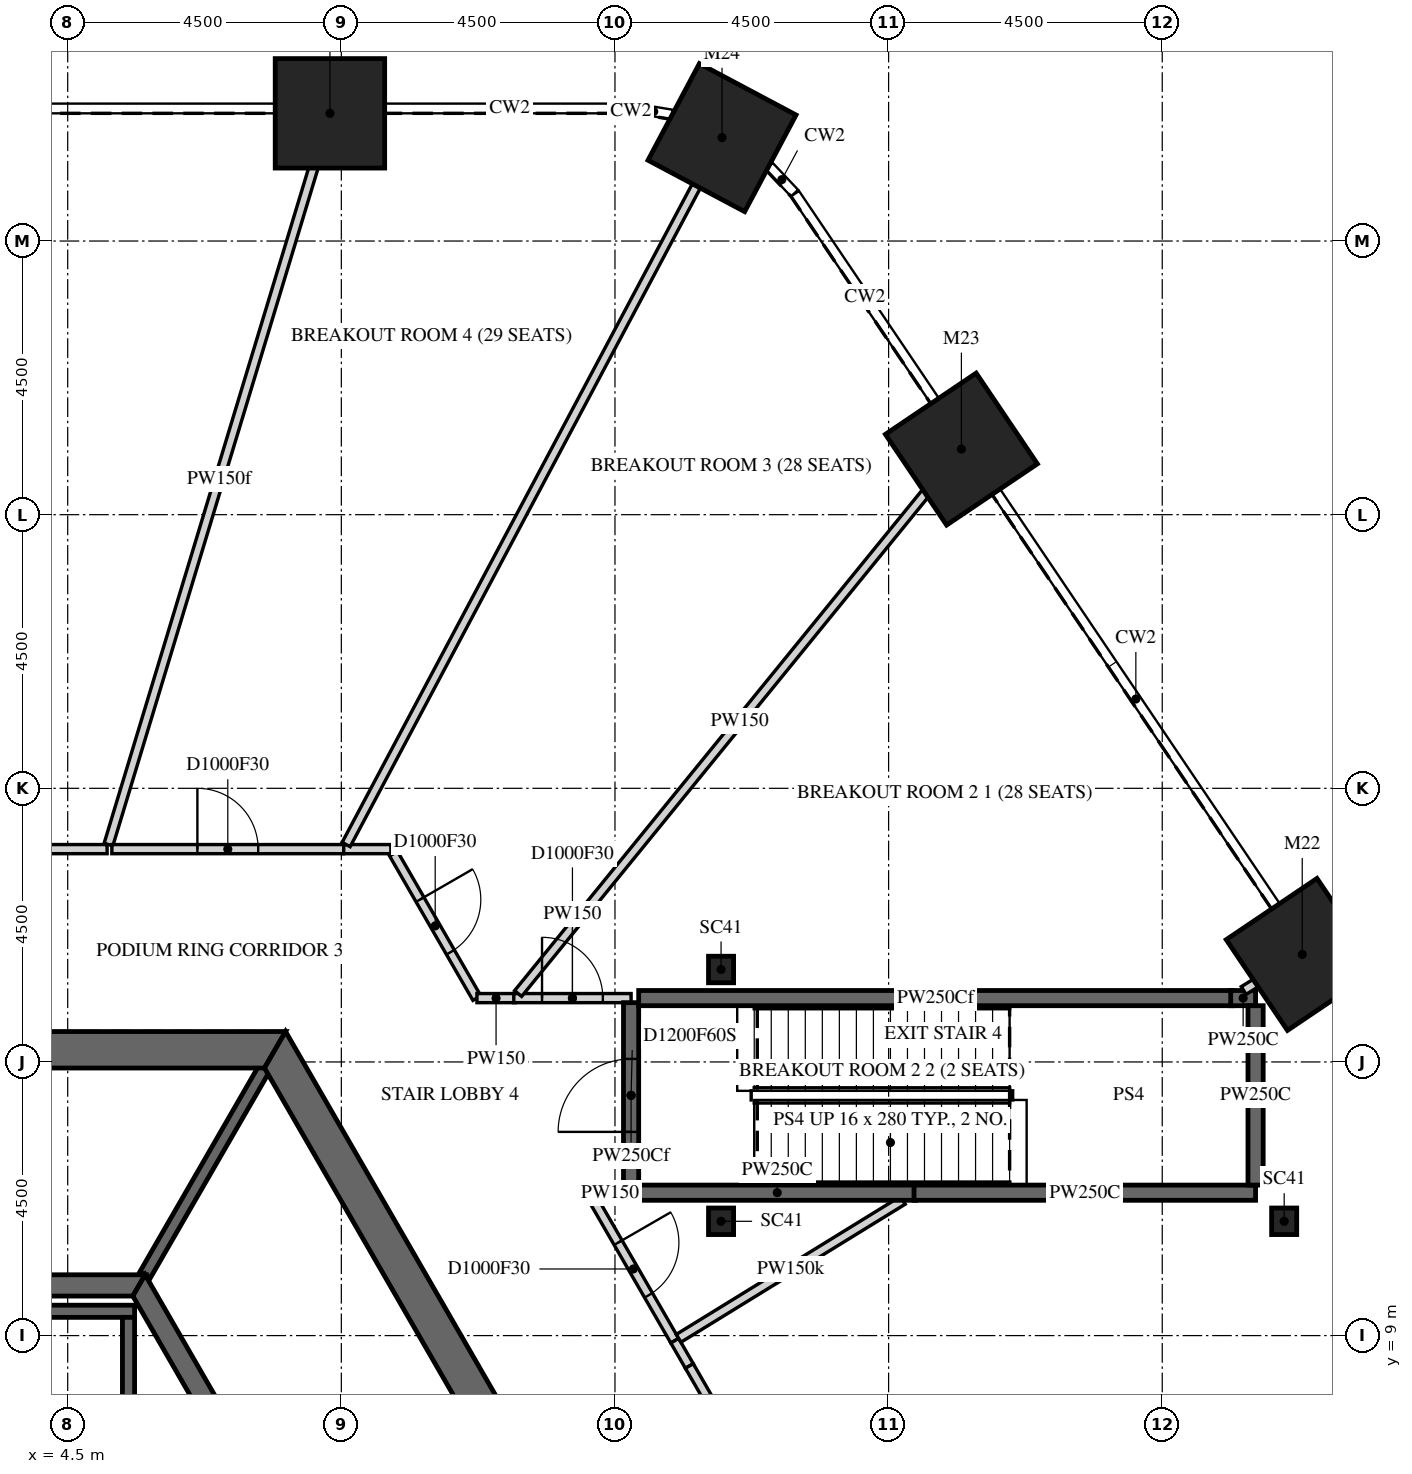
"""IFC4 building model, lengths in metres.
Left out: names, types, materials, properties, quantities, classifications, styles, units other than length and angle.
Written with IfcOpenShell. Run it as: python <this file> out.ifc"""

import sys

from ifc_helpers import new_model, si_unit, direction, frame, frame_2d, origin, origin_2d, place, context, subcontext, project, spatial, polyline, rectangle, i_section, outline, extrude, element, fill, save


model = new_model("IFC4")
c1 = context("Model", 3, precision=1e-05, world=origin(), true_north=direction((0.0, 1.0)))
c2 = subcontext(c1, "Body", "Model", "MODEL_VIEW")
j1 = project(units=[si_unit("LENGTHUNIT", "METRE"), si_unit("PLANEANGLEUNIT", "RADIAN")], contexts=[c1])
p1 = place(None, origin())
s1 = spatial("IfcSite", under=j1, at=p1, CompositionType="ELEMENT")
p2 = place(p1, origin())
s2 = spatial("IfcBuilding", under=s1, at=p2, CompositionType="ELEMENT")
p3 = place(p2, frame((0.0, 0.0, 20.5)))
s3 = spatial("IfcBuildingStorey", under=s2, at=p3, CompositionType="ELEMENT", Elevation=20.5)
for number, where, z_axis, x_axis in (
    (1, (8.812, 29.1, -0.25), (0.0, 0.0, 1.0), (1.0, 0.0, 0.0)),
    (2, (24.802, 15.269, -0.25), (0.0, 0.0, 1.0), (0.559, -0.829, 0.0)),
    (3, (19.197, 23.579, -0.25), (0.0, 0.0, 1.0), (0.559, -0.829, 0.0)),
    (4, (15.26, 28.701, -0.25), (0.0, 0.0, 1.0), (0.883, -0.469, 0.0)),
):
    element("IfcColumn", number, at=place(p3, frame(where, z_axis=z_axis, x_axis=x_axis)), inside=s3, PredefinedType="COLUMN", context=c2, shape_type="SweptSolid", body=[
        extrude(rectangle(XDim=1.8, YDim=1.8, at=origin_2d()), origin(), (0.0, 0.0, 1.0), 5.5),
    ])
for number, where, z_axis, x_axis in (
    (5, (24.505, 10.88, -0.25), (0.0, 0.0, 1.0), (1.0, 0.0, 0.0)),
    (6, (15.245, 10.88, -0.25), (0.0, 0.0, 1.0), (1.0, 0.0, 0.0)),
    (7, (15.245, 15.02, -0.25), (0.0, 0.0, 1.0), (1.0, 0.0, 0.0)),
):
    element("IfcColumn", number, at=place(p3, frame(where, z_axis=z_axis, x_axis=x_axis)), inside=s3, PredefinedType="COLUMN", context=c2, shape_type="SweptSolid", body=[
        extrude(i_section(OverallWidth=0.412, OverallDepth=0.437, WebThickness=0.036, FlangeThickness=0.058, FilletRadius=0.015, at=origin_2d()), origin(), (0.0, 0.0, 1.0), 5.5),
    ])
p4 = place(p3, frame((15.819, 0.0, -0.25), z_axis=(0.0, 0.0, 1.0), x_axis=(-0.499999880136, 0.866025472988, 0.0)))
e8 = element("IfcWall", 8, at=p4, inside=s3, PredefinedType="SHEAR", context=c2, shape_type="SweptSolid", body=[
    extrude(outline(polyline([(-0.173, -0.3), (15.993, -0.3), (15.646, 0.3), (0.173, 0.3), (-0.173, -0.3)])), origin(), (0.0, 0.0, 1.0), 5.5),
])
p5 = place(p4, frame((6.981, 0.0, 0.25)))
e9 = element("IfcOpeningElement", 9, at=p5, cuts=e8, PredefinedType="OPENING", context=c2, shape_type="SweptSolid", body=[
    extrude(rectangle(XDim=1.8, YDim=2.4, at=frame_2d((0.9, 1.2))), frame((0.0, 0.31, 0.0), z_axis=(0.0, -1.0, 0.0), x_axis=(1.0, 0.0, 0.0)), (0.0, 0.0, 1.0), 0.62),
])
p6 = place(p3, frame((7.91, 13.7, -0.25), z_axis=(0.0, 0.0, 1.0), x_axis=(-1.0, 0.0, 0.0)))
e10 = element("IfcWall", 10, at=p6, inside=s3, PredefinedType="SHEAR", context=c2, shape_type="SweptSolid", body=[
    extrude(outline(polyline([(-0.173, -0.3), (15.993, -0.3), (15.646, 0.3), (0.173, 0.3), (-0.173, -0.3)])), origin(), (0.0, 0.0, 1.0), 5.5),
])
p7 = place(p6, frame((7.31, 0.0, 0.25)))
e11 = element("IfcOpeningElement", 11, at=p7, cuts=e10, PredefinedType="OPENING", context=c2, shape_type="SweptSolid", body=[
    extrude(rectangle(XDim=1.2, YDim=2.4, at=frame_2d((0.6, 1.2))), frame((0.0, 0.31, 0.0), z_axis=(0.0, -1.0, 0.0), x_axis=(1.0, 0.0, 0.0)), (0.0, 0.0, 1.0), 0.62),
])
p8 = place(p3, frame((11.345, 0.0, -0.25), z_axis=(0.0, 0.0, 1.0), x_axis=(-0.499995046907, 0.866028263435, 0.0)))
e12 = element("IfcWall", 12, at=p8, inside=s3, PredefinedType="SHEAR", context=c2, shape_type="SweptSolid", body=[
    extrude(outline(polyline([(-0.101, -0.175), (11.446, -0.175), (11.244, 0.175), (0.101, 0.175), (-0.101, -0.175)])), origin(), (0.0, 0.0, 1.0), 5.5),
])
p9 = place(p8, frame((4.744, 0.0, 0.25)))
e13 = element("IfcOpeningElement", 13, at=p9, cuts=e12, PredefinedType="OPENING", context=c2, shape_type="SweptSolid", body=[
    extrude(rectangle(XDim=1.8, YDim=2.4, at=frame_2d((0.9, 1.2))), frame((0.0, 0.185, 0.0), z_axis=(0.0, -1.0, 0.0), x_axis=(1.0, 0.0, 0.0)), (0.0, 0.0, 1.0), 0.37),
])
p10 = place(p3, frame((5.673, 9.825, -0.25), z_axis=(0.0, 0.0, 1.0), x_axis=(-1.0, 0.0, 0.0)))
e14 = element("IfcWall", 14, at=p10, inside=s3, PredefinedType="SHEAR", context=c2, shape_type="SweptSolid", body=[
    extrude(outline(polyline([(-0.101, -0.175), (11.446, -0.175), (11.244, 0.175), (0.101, 0.175), (-0.101, -0.175)])), origin(), (0.0, 0.0, 1.0), 5.5),
])
p11 = place(p3, frame((-5.6, 9.4, -0.25), z_axis=(0.0, 0.0, 1.0), x_axis=(1.0, 0.0, 0.0)))
e15 = element("IfcWall", 15, at=p11, inside=s3, PredefinedType="SHEAR", context=c2, shape_type="SweptSolid", body=[
    extrude(rectangle(XDim=11.2, YDim=0.2, at=frame_2d((5.6, 0.0))), origin(), (0.0, 0.0, 1.0), 5.5),
])
p12 = place(p3, frame((5.5, 6.4, -0.25), z_axis=(0.0, 0.0, 1.0), x_axis=(0.0, 1.0, 0.0)))
e16 = element("IfcWall", 16, at=p12, inside=s3, PredefinedType="SHEAR", context=c2, shape_type="SweptSolid", body=[
    extrude(rectangle(XDim=2.9, YDim=0.2, at=frame_2d((1.45, 0.0))), origin(), (0.0, 0.0, 1.0), 5.5),
])
p13 = place(p3, frame((5.773, 10.0, -0.25), z_axis=(0.0, 0.0, 1.0), x_axis=(0.500038251005, 0.86600331843, 0.0)))
e17 = element("IfcWall", 17, at=p13, inside=s3, PredefinedType="SHEAR", context=c2, shape_type="SweptSolid", body=[
    extrude(rectangle(XDim=3.926, YDim=0.2, at=frame_2d((1.963, 0.0))), origin(), (0.0, 0.0, 1.0), 5.5),
])
p14 = place(p3, frame((-6.563, 17.0, 0.0), z_axis=(0.0, 0.0, 1.0), x_axis=(1.0, 0.0, 0.0)))
e18 = element("IfcWall", 18, at=p14, inside=s3, PredefinedType="PARTITIONING", context=c2, shape_type="SweptSolid", body=[
    extrude(rectangle(XDim=11.711, YDim=0.15, at=frame_2d((5.855, 0.0))), origin(), (0.0, 0.0, 1.0), 5.25),
])
p15 = place(p14, frame((4.956, 0.0, 0.0)))
e19 = element("IfcOpeningElement", 19, at=p15, cuts=e18, PredefinedType="OPENING", context=c2, shape_type="SweptSolid", body=[
    extrude(rectangle(XDim=1.8, YDim=2.1, at=frame_2d((0.9, 1.05))), frame((0.0, 0.085, 0.0), z_axis=(0.0, -1.0, 0.0), x_axis=(1.0, 0.0, 0.0)), (0.0, 0.0, 1.0), 0.17),
])
p16 = place(p3, frame((5.171, 17.075, 0.0), z_axis=(0.0, 0.0, 1.0), x_axis=(0.289887131616, 0.957060839719, 0.0)))
e20 = element("IfcWall", 20, at=p16, inside=s3, PredefinedType="PARTITIONING", context=c2, shape_type="SweptSolid", body=[
    extrude(rectangle(XDim=12.565, YDim=0.15, at=frame_2d((6.282, 0.0))), origin(), (0.0, 0.0, 1.0), 4.496),
])
p17 = place(p3, frame((5.226, 17.0, 0.0), z_axis=(0.0, 0.0, 1.0), x_axis=(1.0, 0.0, 0.0)))
e21 = element("IfcWall", 21, at=p17, inside=s3, PredefinedType="PARTITIONING", context=c2, shape_type="SweptSolid", body=[
    extrude(rectangle(XDim=3.813, YDim=0.15, at=frame_2d((1.906, 0.0))), origin(), (0.0, 0.0, 1.0), 5.25),
])
p18 = place(p17, frame((1.406, 0.0, 0.0)))
e22 = element("IfcOpeningElement", 22, at=p18, cuts=e21, PredefinedType="OPENING", context=c2, shape_type="SweptSolid", body=[
    extrude(rectangle(XDim=1.0, YDim=2.1, at=frame_2d((0.5, 1.05))), frame((0.0, 0.085, 0.0), z_axis=(0.0, -1.0, 0.0), x_axis=(1.0, 0.0, 0.0)), (0.0, 0.0, 1.0), 0.17),
])
p19 = place(p3, frame((9.815, 17.0, 0.0), z_axis=(0.0, 0.0, 1.0), x_axis=(-1.0, 0.0, 0.0)))
e23 = element("IfcWall", 23, at=p19, inside=s3, PredefinedType="PARTITIONING", context=c2, shape_type="SweptSolid", body=[
    extrude(rectangle(XDim=0.776, YDim=0.15, at=frame_2d((0.388, 0.0))), origin(), (0.0, 0.0, 1.0), 5.25),
])
p20 = place(p3, frame((9.858, 16.925, 0.0), z_axis=(0.0, 0.0, 1.0), x_axis=(0.499835495421, -0.866120359718, 0.0)))
e24 = element("IfcWall", 24, at=p20, inside=s3, PredefinedType="PARTITIONING", context=c2, shape_type="SweptSolid", body=[
    extrude(rectangle(XDim=2.742, YDim=0.15, at=frame_2d((1.371, 0.0))), origin(), (0.0, 0.0, 1.0), 5.25),
])
p21 = place(p20, frame((0.871, 0.0, 0.0)))
e25 = element("IfcOpeningElement", 25, at=p21, cuts=e24, PredefinedType="OPENING", context=c2, shape_type="SweptSolid", body=[
    extrude(rectangle(XDim=1.0, YDim=2.1, at=frame_2d((0.5, 1.05))), frame((0.0, 0.085, 0.0), z_axis=(0.0, -1.0, 0.0), x_axis=(1.0, 0.0, 0.0)), (0.0, 0.0, 1.0), 0.17),
])
p22 = place(p3, frame((11.23, 14.55, 0.0), z_axis=(0.0, 0.0, 1.0), x_axis=(1.0, 0.0, 0.0)))
e26 = element("IfcWall", 26, at=p22, inside=s3, PredefinedType="PARTITIONING", context=c2, shape_type="SweptSolid", body=[
    extrude(rectangle(XDim=0.629, YDim=0.15, at=frame_2d((0.314, 0.0))), origin(), (0.0, 0.0, 1.0), 5.25),
])
p23 = place(p3, frame((11.836, 14.55, 0.0), z_axis=(0.0, 0.0, 1.0), x_axis=(1.0, 0.0, 0.0)))
e27 = element("IfcWall", 27, at=p23, inside=s3, PredefinedType="PARTITIONING", context=c2, shape_type="SweptSolid", body=[
    extrude(rectangle(XDim=1.929, YDim=0.15, at=frame_2d((0.964, 0.0))), origin(), (0.0, 0.0, 1.0), 5.25),
])
p24 = place(p23, frame((0.465, 0.0, 0.0)))
e28 = element("IfcOpeningElement", 28, at=p24, cuts=e27, PredefinedType="OPENING", context=c2, shape_type="SweptSolid", body=[
    extrude(rectangle(XDim=1.0, YDim=2.1, at=frame_2d((0.5, 1.05))), frame((0.0, 0.085, 0.0), z_axis=(0.0, -1.0, 0.0), x_axis=(1.0, 0.0, 0.0)), (0.0, 0.0, 1.0), 0.17),
])
p25 = place(p3, frame((13.765, 11.35, 0.0), z_axis=(0.0, 0.0, 1.0), x_axis=(-1.0, 0.0, 0.0)))
e29 = element("IfcWall", 29, at=p25, inside=s3, PredefinedType="PARTITIONING", context=c2, shape_type="SweptSolid", body=[
    extrude(rectangle(XDim=0.688, YDim=0.15, at=frame_2d((0.344, 0.0))), origin(), (0.0, 0.0, 1.0), 5.25),
])
p26 = place(p3, frame((13.765, 11.425, 0.0), z_axis=(0.0, 0.0, 1.0), x_axis=(0.0, 1.0, 0.0)))
e30 = element("IfcWall", 30, at=p26, inside=s3, PredefinedType="PARTITIONING", context=c2, shape_type="SweptSolid", body=[
    extrude(rectangle(XDim=3.05, YDim=0.25, at=frame_2d((1.525, 0.0))), origin(), (0.0, 0.0, 1.0), 4.496),
])
p27 = place(p26, frame((0.925, 0.0, 0.0)))
e31 = element("IfcOpeningElement", 31, at=p27, cuts=e30, PredefinedType="OPENING", context=c2, shape_type="SweptSolid", body=[
    extrude(rectangle(XDim=1.2, YDim=2.1, at=frame_2d((0.6, 1.05))), frame((0.0, 0.135, 0.0), z_axis=(0.0, -1.0, 0.0), x_axis=(1.0, 0.0, 0.0)), (0.0, 0.0, 1.0), 0.27),
])
p28 = place(p3, frame((13.89, 14.55, 0.0), z_axis=(0.0, 0.0, 1.0), x_axis=(1.0, 0.0, 0.0)))
e32 = element("IfcWall", 32, at=p28, inside=s3, PredefinedType="PARTITIONING", context=c2, shape_type="SweptSolid", body=[
    extrude(rectangle(XDim=9.765, YDim=0.25, at=frame_2d((4.883, 0.0))), origin(), (0.0, 0.0, 1.0), 4.496),
])
p29 = place(p3, frame((13.12, 11.275, 0.0), z_axis=(0.0, 0.0, 1.0), x_axis=(0.500177554253, -0.865922868517, 0.0)))
e33 = element("IfcWall", 33, at=p29, inside=s3, PredefinedType="PARTITIONING", context=c2, shape_type="SweptSolid", body=[
    extrude(rectangle(XDim=2.724, YDim=0.15, at=frame_2d((1.362, 0.0))), origin(), (0.0, 0.0, 1.0), 5.25),
])
p30 = place(p29, frame((0.862, 0.0, 0.0)))
e34 = element("IfcOpeningElement", 34, at=p30, cuts=e33, PredefinedType="OPENING", context=c2, shape_type="SweptSolid", body=[
    extrude(rectangle(XDim=1.0, YDim=2.1, at=frame_2d((0.5, 1.05))), frame((0.0, 0.085, 0.0), z_axis=(0.0, -1.0, 0.0), x_axis=(1.0, 0.0, 0.0)), (0.0, 0.0, 1.0), 0.17),
])
p31 = place(p3, frame((14.723, 8.5, 0.0), z_axis=(0.0, 0.0, 1.0), x_axis=(-0.499693115345, 0.866202511239, 0.0)))
e35 = element("IfcWall", 35, at=p31, inside=s3, PredefinedType="PARTITIONING", context=c2, shape_type="SweptSolid", body=[
    extrude(rectangle(XDim=0.48, YDim=0.15, at=frame_2d((0.24, 0.0))), origin(), (0.0, 0.0, 1.0), 5.25),
])
p32 = place(p3, frame((15.261, 28.701, 0.0), z_axis=(0.0, 0.0, 1.0), x_axis=(-0.469500426527, -0.882932245131, 0.0)))
e36 = element("IfcWall", 36, at=p32, inside=s3, PredefinedType="PARTITIONING", context=c2, shape_type="SweptSolid", body=[
    extrude(rectangle(XDim=13.167, YDim=0.15, at=frame_2d((6.584, 0.0))), origin(), (0.0, 0.0, 1.0), 4.488),
])
p33 = place(p3, frame((17.339, 3.968, 0.0), z_axis=(0.0, 0.0, 1.0), x_axis=(-0.499952654668, 0.866052736899, 0.0)))
e37 = element("IfcWall", 37, at=p33, inside=s3, PredefinedType="PARTITIONING", context=c2, shape_type="SweptSolid", body=[
    extrude(rectangle(XDim=5.233, YDim=0.15, at=frame_2d((2.616, 0.0))), origin(), (0.0, 0.0, 1.0), 5.25),
])
p34 = place(p3, frame((18.234, 11.225, 0.0), z_axis=(0.0, 0.0, 1.0), x_axis=(-0.851571181887, -0.524238993379, 0.0)))
e38 = element("IfcWall", 38, at=p34, inside=s3, PredefinedType="PARTITIONING", context=c2, shape_type="SweptSolid", body=[
    extrude(rectangle(XDim=4.33, YDim=0.15, at=frame_2d((2.165, 0.0))), origin(), (0.0, 0.0, 1.0), 4.323),
])
p35 = place(p3, frame((18.447, 11.35, 0.0), z_axis=(0.0, 0.0, 1.0), x_axis=(-1.0, 0.0, 0.0)))
e39 = element("IfcWall", 39, at=p35, inside=s3, PredefinedType="PARTITIONING", context=c2, shape_type="SweptSolid", body=[
    extrude(rectangle(XDim=4.557, YDim=0.25, at=frame_2d((2.279, 0.0))), origin(), (0.0, 0.0, 1.0), 5.25),
])
p36 = place(p3, frame((19.197, 23.578, 0.0), z_axis=(0.0, 0.0, 1.0), x_axis=(-0.631417805909, -0.775442811805, 0.0)))
e40 = element("IfcWall", 40, at=p36, inside=s3, PredefinedType="PARTITIONING", context=c2, shape_type="SweptSolid", body=[
    extrude(rectangle(XDim=11.545, YDim=0.15, at=frame_2d((5.773, 0.0))), origin(), (0.0, 0.0, 1.0), 5.25),
])
p37 = place(p3, frame((23.626, 14.55, 0.0), z_axis=(0.0, 0.0, 1.0), x_axis=(1.0, 0.0, 0.0)))
e41 = element("IfcWall", 41, at=p37, inside=s3, PredefinedType="PARTITIONING", context=c2, shape_type="SweptSolid", body=[
    extrude(rectangle(XDim=0.409, YDim=0.25, at=frame_2d((0.205, 0.0))), origin(), (0.0, 0.0, 1.0), 5.25),
])
p38 = place(p3, frame((24.035, 11.35, 0.0), z_axis=(0.0, 0.0, 1.0), x_axis=(-1.0, 0.0, 0.0)))
e42 = element("IfcWall", 42, at=p38, inside=s3, PredefinedType="PARTITIONING", context=c2, shape_type="SweptSolid", body=[
    extrude(rectangle(XDim=5.617, YDim=0.25, at=frame_2d((2.809, 0.0))), origin(), (0.0, 0.0, 1.0), 5.25),
])
p39 = place(p3, frame((24.035, 14.425, 0.0), z_axis=(0.0, 0.0, 1.0), x_axis=(0.0, -1.0, 0.0)))
e43 = element("IfcWall", 43, at=p39, inside=s3, PredefinedType="PARTITIONING", context=c2, shape_type="SweptSolid", body=[
    extrude(rectangle(XDim=2.95, YDim=0.25, at=frame_2d((1.475, 0.0))), origin(), (0.0, 0.0, 1.0), 5.25),
])
p40 = place(p3, frame((24.802, 15.268, 0.0), z_axis=(0.0, 0.0, 1.0), x_axis=(-0.851472949554, -0.524398528009, 0.0)))
e44 = element("IfcWall", 44, at=p40, inside=s3, PredefinedType="PARTITIONING", context=c2, shape_type="SweptSolid", body=[
    extrude(rectangle(XDim=1.131, YDim=0.15, at=frame_2d((0.565, 0.0))), origin(), (0.0, 0.0, 1.0), 4.323),
])
p41 = place(p18, origin())
e45 = element("IfcDoor", 45, at=p41, inside=s3, OperationType="SINGLE_SWING_LEFT", PredefinedType="DOOR", context=c2, shape_type="SweptSolid", body=[
    extrude(rectangle(XDim=1.0, YDim=2.1, at=frame_2d((0.5, 1.05))), frame((0.0, 0.025, 0.0), z_axis=(0.0, -1.0, 0.0), x_axis=(1.0, 0.0, 0.0)), (0.0, 0.0, 1.0), 0.05),
])
fill(e22, e45)
p42 = place(p21, origin())
e46 = element("IfcDoor", 46, at=p42, inside=s3, OperationType="SINGLE_SWING_LEFT", PredefinedType="DOOR", context=c2, shape_type="SweptSolid", body=[
    extrude(rectangle(XDim=1.0, YDim=2.1, at=frame_2d((0.5, 1.05))), frame((0.0, 0.025, 0.0), z_axis=(0.0, -1.0, 0.0), x_axis=(1.0, 0.0, 0.0)), (0.0, 0.0, 1.0), 0.05),
])
fill(e25, e46)
p43 = place(p24, origin())
e47 = element("IfcDoor", 47, at=p43, inside=s3, OperationType="SINGLE_SWING_RIGHT", PredefinedType="DOOR", context=c2, shape_type="SweptSolid", body=[
    extrude(rectangle(XDim=1.0, YDim=2.1, at=frame_2d((0.5, 1.05))), frame((0.0, 0.025, 0.0), z_axis=(0.0, -1.0, 0.0), x_axis=(1.0, 0.0, 0.0)), (0.0, 0.0, 1.0), 0.05),
])
fill(e28, e47)
p44 = place(p27, origin())
e48 = element("IfcDoor", 48, at=p44, inside=s3, OperationType="SINGLE_SWING_LEFT", PredefinedType="DOOR", context=c2, shape_type="SweptSolid", body=[
    extrude(rectangle(XDim=1.2, YDim=2.1, at=frame_2d((0.6, 1.05))), frame((0.0, 0.025, 0.0), z_axis=(0.0, -1.0, 0.0), x_axis=(1.0, 0.0, 0.0)), (0.0, 0.0, 1.0), 0.05),
])
fill(e31, e48)
p45 = place(p30, origin())
e49 = element("IfcDoor", 49, at=p45, inside=s3, OperationType="SINGLE_SWING_RIGHT", PredefinedType="DOOR", context=c2, shape_type="SweptSolid", body=[
    extrude(rectangle(XDim=1.0, YDim=2.1, at=frame_2d((0.5, 1.05))), frame((0.0, 0.025, 0.0), z_axis=(0.0, -1.0, 0.0), x_axis=(1.0, 0.0, 0.0)), (0.0, 0.0, 1.0), 0.05),
])
fill(e34, e49)
save(model, sys.argv[1])
